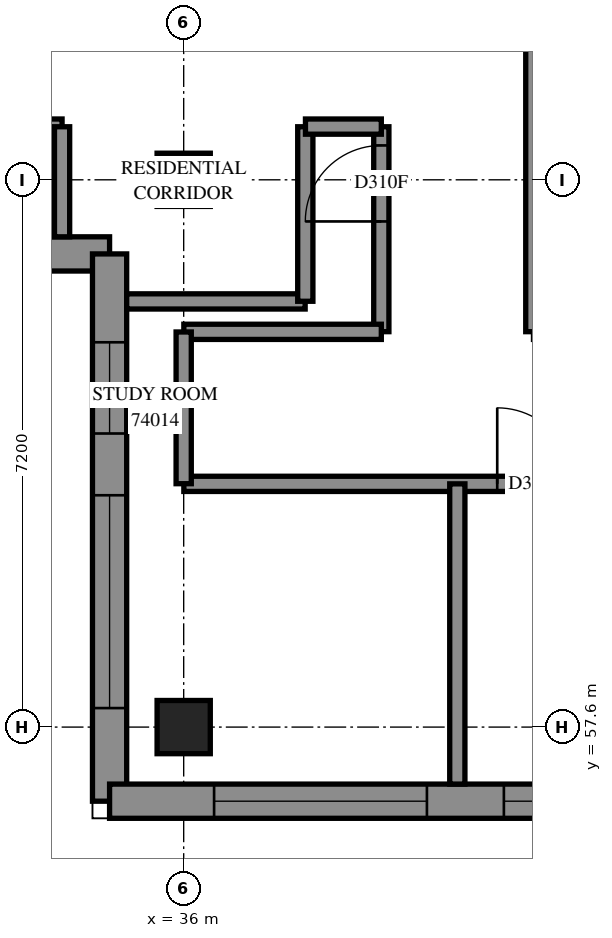
"""IFC4 building model, lengths in metres.
Left out: names, types, materials, properties, quantities, classifications, styles, units other than length and angle.
Written with IfcOpenShell. Run it as: python <this file> out.ifc"""

import sys

from ifc_helpers import new_model, si_unit, direction, frame, frame_2d, origin, origin_2d, place, context, subcontext, project, spatial, polyline, rectangle, outline, extrude, element, fill, save


model = new_model("IFC4")
c1 = context("Model", 3, precision=1e-05, world=origin(), true_north=direction((0.0, 1.0)))
c2 = subcontext(c1, "Body", "Model", "MODEL_VIEW")
j1 = project(units=[si_unit("LENGTHUNIT", "METRE"), si_unit("PLANEANGLEUNIT", "RADIAN")], contexts=[c1])
p1 = place(None, origin())
s1 = spatial("IfcSite", under=j1, at=p1, CompositionType="ELEMENT")
p2 = place(p1, origin())
s2 = spatial("IfcBuilding", under=s1, at=p2, CompositionType="ELEMENT")
p3 = place(p2, frame((0.0, 0.0, 271.0)))
s3 = spatial("IfcBuildingStorey", under=s2, at=p3, CompositionType="ELEMENT", Elevation=271.0)
for number, where, z_axis, x_axis in (
    (1, (36.0, 57.6, 0.0), (0.0, 0.0, 1.0), (1.0, 0.0, 0.0)),
    (2, (36.0, 64.8, 0.0), (0.0, 0.0, 1.0), (1.0, 0.0, 0.0)),
):
    element("IfcColumn", number, at=place(p3, frame(where, z_axis=z_axis, x_axis=x_axis)), inside=s3, PredefinedType="COLUMN", context=c2, shape_type="SweptSolid", body=[
        extrude(rectangle(XDim=0.7, YDim=0.7, at=origin_2d()), origin(), (0.0, 0.0, 1.0), 3.1),
    ])
p4 = place(p3, frame((26.683, 63.825, 0.0), z_axis=(0.0, 0.0, 1.0), x_axis=(1.0, 0.0, 0.0)))
e3 = element("IfcWall", 3, at=p4, inside=s3, PredefinedType="SOLIDWALL", context=c2, shape_type="SweptSolid", body=[
    extrude(outline(polyline([(-0.225, -0.225), (8.117, -0.225), (8.567, 0.225), (0.225, 0.225), (-0.225, -0.225)])), origin(), (0.0, 0.0, 1.0), 3.1),
])
p5 = place(p4, frame((2.517, 0.0, 0.45)))
e4 = element("IfcOpeningElement", 4, at=p5, cuts=e3, PredefinedType="OPENING", context=c2, shape_type="SweptSolid", body=[
    extrude(rectangle(XDim=2.8, YDim=2.55, at=frame_2d((1.4, 1.275))), frame((0.0, 0.235, 0.0), z_axis=(0.0, -1.0, 0.0), x_axis=(1.0, 0.0, 0.0)), (0.0, 0.0, 1.0), 0.47),
])
p6 = place(p4, frame((0.671, 0.0, 0.45)))
e5 = element("IfcOpeningElement", 5, at=p6, cuts=e3, PredefinedType="OPENING", context=c2, shape_type="SweptSolid", body=[
    extrude(rectangle(XDim=1.2, YDim=2.55, at=frame_2d((0.6, 1.275))), frame((0.0, 0.235, 0.0), z_axis=(0.0, -1.0, 0.0), x_axis=(1.0, 0.0, 0.0)), (0.0, 0.0, 1.0), 0.47),
])
p7 = place(p4, frame((6.33, 0.0, 0.45)))
e6 = element("IfcOpeningElement", 6, at=p7, cuts=e3, PredefinedType="OPENING", context=c2, shape_type="SweptSolid", body=[
    extrude(rectangle(XDim=1.2, YDim=2.55, at=frame_2d((0.6, 1.275))), frame((0.0, 0.235, 0.0), z_axis=(0.0, -1.0, 0.0), x_axis=(1.0, 0.0, 0.0)), (0.0, 0.0, 1.0), 0.47),
])
p8 = place(p3, frame((35.025, 63.825, 0.0), z_axis=(0.0, 0.0, 1.0), x_axis=(0.0, -1.0, 0.0)))
e7 = element("IfcWall", 7, at=p8, inside=s3, PredefinedType="SOLIDWALL", context=c2, shape_type="SweptSolid", body=[
    extrude(outline(polyline([(0.225, -0.225), (7.425, -0.225), (6.975, 0.225), (-0.225, 0.225), (0.225, -0.225)])), origin(), (0.0, 0.0, 1.0), 3.1),
])
p9 = place(p8, frame((3.175, 0.0, 0.45)))
e8 = element("IfcOpeningElement", 8, at=p9, cuts=e7, PredefinedType="OPENING", context=c2, shape_type="SweptSolid", body=[
    extrude(rectangle(XDim=2.8, YDim=2.55, at=frame_2d((1.4, 1.275))), frame((0.0, 0.235, 0.0), z_axis=(0.0, -1.0, 0.0), x_axis=(1.0, 0.0, 0.0)), (0.0, 0.0, 1.0), 0.47),
])
p10 = place(p8, frame((1.163, 0.0, 0.45)))
e9 = element("IfcOpeningElement", 9, at=p10, cuts=e7, PredefinedType="OPENING", context=c2, shape_type="SweptSolid", body=[
    extrude(rectangle(XDim=1.2, YDim=2.55, at=frame_2d((0.6, 1.275))), frame((0.0, 0.235, 0.0), z_axis=(0.0, -1.0, 0.0), x_axis=(1.0, 0.0, 0.0)), (0.0, 0.0, 1.0), 0.47),
])
p11 = place(p3, frame((35.025, 56.625, 0.0), z_axis=(0.0, 0.0, 1.0), x_axis=(1.0, 0.0, 0.0)))
e10 = element("IfcWall", 10, at=p11, inside=s3, PredefinedType="SOLIDWALL", context=c2, shape_type="SweptSolid", body=[
    extrude(outline(polyline([(-0.225, -0.225), (6.975, -0.225), (7.425, 0.225), (0.225, 0.225), (-0.225, -0.225)])), origin(), (0.0, 0.0, 1.0), 3.1),
])
p12 = place(p11, frame((1.375, 0.0, 0.45)))
e11 = element("IfcOpeningElement", 11, at=p12, cuts=e10, PredefinedType="OPENING", context=c2, shape_type="SweptSolid", body=[
    extrude(rectangle(XDim=2.8, YDim=2.55, at=frame_2d((1.4, 1.275))), frame((0.0, 0.235, 0.0), z_axis=(0.0, -1.0, 0.0), x_axis=(1.0, 0.0, 0.0)), (0.0, 0.0, 1.0), 0.47),
])
p13 = place(p11, frame((5.188, 0.0, 0.45)))
e12 = element("IfcOpeningElement", 12, at=p13, cuts=e10, PredefinedType="OPENING", context=c2, shape_type="SweptSolid", body=[
    extrude(rectangle(XDim=1.2, YDim=2.55, at=frame_2d((0.6, 1.275))), frame((0.0, 0.235, 0.0), z_axis=(0.0, -1.0, 0.0), x_axis=(1.0, 0.0, 0.0)), (0.0, 0.0, 1.0), 0.47),
])
p14 = place(p3, frame((36.002, 60.8, 0.0), z_axis=(0.0, 0.0, 1.0), x_axis=(1.0, 0.0, 0.0)))
e13 = element("IfcWall", 13, at=p14, inside=s3, PredefinedType="PARTITIONING", context=c2, shape_type="SweptSolid", body=[
    extrude(rectangle(XDim=16.998, YDim=0.2, at=frame_2d((8.499, 0.0))), origin(), (0.0, 0.0, 1.0), 3.1),
])
p15 = place(p14, frame((4.123, 0.0, 0.0)))
e14 = element("IfcOpeningElement", 14, at=p15, cuts=e13, PredefinedType="OPENING", context=c2, shape_type="SweptSolid", body=[
    extrude(rectangle(XDim=1.0, YDim=2.1, at=frame_2d((0.5, 1.05))), frame((0.0, 0.11, 0.0), z_axis=(0.0, -1.0, 0.0), x_axis=(1.0, 0.0, 0.0)), (0.0, 0.0, 1.0), 0.22),
])
p16 = place(p14, frame((9.23, 0.0, 0.0)))
e15 = element("IfcOpeningElement", 15, at=p16, cuts=e13, PredefinedType="OPENING", context=c2, shape_type="SweptSolid", body=[
    extrude(rectangle(XDim=1.0, YDim=2.1, at=frame_2d((0.5, 1.05))), frame((0.0, 0.11, 0.0), z_axis=(0.0, -1.0, 0.0), x_axis=(1.0, 0.0, 0.0)), (0.0, 0.0, 1.0), 0.22),
])
p17 = place(p14, frame((11.306, 0.0, 0.0)))
e16 = element("IfcOpeningElement", 16, at=p17, cuts=e13, PredefinedType="OPENING", context=c2, shape_type="SweptSolid", body=[
    extrude(rectangle(XDim=1.0, YDim=2.1, at=frame_2d((0.5, 1.05))), frame((0.0, 0.11, 0.0), z_axis=(0.0, -1.0, 0.0), x_axis=(1.0, 0.0, 0.0)), (0.0, 0.0, 1.0), 0.22),
])
p18 = place(p14, frame((15.872, 0.0, 0.0)))
e17 = element("IfcOpeningElement", 17, at=p18, cuts=e13, PredefinedType="OPENING", context=c2, shape_type="SweptSolid", body=[
    extrude(rectangle(XDim=1.0, YDim=2.1, at=frame_2d((0.5, 1.05))), frame((0.0, 0.11, 0.0), z_axis=(0.0, -1.0, 0.0), x_axis=(1.0, 0.0, 0.0)), (0.0, 0.0, 1.0), 0.22),
])
p19 = place(p3, frame((28.802, 65.5, 0.0), z_axis=(0.0, 0.0, 1.0), x_axis=(1.0, 0.0, 0.0)))
e18 = element("IfcWall", 18, at=p19, inside=s3, PredefinedType="PARTITIONING", context=c2, shape_type="SweptSolid", body=[
    extrude(rectangle(XDim=5.598, YDim=0.2, at=frame_2d((2.799, 0.0))), origin(), (0.0, 0.0, 1.0), 3.1),
])
p20 = place(p19, frame((2.702, 0.0, 0.0)))
e19 = element("IfcOpeningElement", 19, at=p20, cuts=e18, PredefinedType="OPENING", context=c2, shape_type="SweptSolid", body=[
    extrude(rectangle(XDim=1.0, YDim=2.1, at=frame_2d((0.5, 1.05))), frame((0.0, 0.11, 0.0), z_axis=(0.0, -1.0, 0.0), x_axis=(1.0, 0.0, 0.0)), (0.0, 0.0, 1.0), 0.22),
])
p21 = place(p3, frame((40.6, 62.802, 0.0), z_axis=(0.0, 0.0, 1.0), x_axis=(0.0, 1.0, 0.0)))
e20 = element("IfcWall", 20, at=p21, inside=s3, PredefinedType="PARTITIONING", context=c2, shape_type="SweptSolid", body=[
    extrude(rectangle(XDim=4.698, YDim=0.2, at=frame_2d((2.349, 0.0))), origin(), (0.0, 0.0, 1.0), 3.1),
])
p22 = place(p3, frame((39.6, 56.85, 0.0), z_axis=(0.0, 0.0, 1.0), x_axis=(0.0, 1.0, 0.0)))
e21 = element("IfcWall", 21, at=p22, inside=s3, PredefinedType="PARTITIONING", context=c2, shape_type="SweptSolid", body=[
    extrude(rectangle(XDim=3.95, YDim=0.2, at=frame_2d((1.975, 0.0))), origin(), (0.0, 0.0, 1.0), 3.1),
])
p23 = place(p3, frame((38.6, 62.802, 0.0), z_axis=(0.0, 0.0, 1.0), x_axis=(0.0, 1.0, 0.0)))
e22 = element("IfcWall", 22, at=p23, inside=s3, PredefinedType="PARTITIONING", context=c2, shape_type="SweptSolid", body=[
    extrude(rectangle(XDim=2.696, YDim=0.2, at=frame_2d((1.348, 0.0))), origin(), (0.0, 0.0, 1.0), 3.1),
])
p24 = place(p23, frame((1.45, 0.0, 0.0)))
e23 = element("IfcOpeningElement", 23, at=p24, cuts=e22, PredefinedType="OPENING", context=c2, shape_type="SweptSolid", body=[
    extrude(rectangle(XDim=1.0, YDim=2.1, at=frame_2d((0.5, 1.05))), frame((0.0, 0.11, 0.0), z_axis=(0.0, -1.0, 0.0), x_axis=(1.0, 0.0, 0.0)), (0.0, 0.0, 1.0), 0.22),
])
p25 = place(p3, frame((36.002, 62.8, 0.0), z_axis=(0.0, 0.0, 1.0), x_axis=(1.0, 0.0, 0.0)))
e24 = element("IfcWall", 24, at=p25, inside=s3, PredefinedType="PARTITIONING", context=c2, shape_type="SweptSolid", body=[
    extrude(rectangle(XDim=2.598, YDim=0.2, at=frame_2d((1.299, 0.0))), origin(), (0.0, 0.0, 1.0), 3.1),
])
p26 = place(p3, frame((35.25, 63.2, 0.0), z_axis=(0.0, 0.0, 1.0), x_axis=(1.0, 0.0, 0.0)))
e25 = element("IfcWall", 25, at=p26, inside=s3, PredefinedType="PARTITIONING", context=c2, shape_type="SweptSolid", body=[
    extrude(rectangle(XDim=2.348, YDim=0.2, at=frame_2d((1.174, 0.0))), origin(), (0.0, 0.0, 1.0), 3.1),
])
p27 = place(p3, frame((37.6, 63.202, 0.0), z_axis=(0.0, 0.0, 1.0), x_axis=(0.0, 1.0, 0.0)))
e26 = element("IfcWall", 26, at=p27, inside=s3, PredefinedType="PARTITIONING", context=c2, shape_type="SweptSolid", body=[
    extrude(rectangle(XDim=2.296, YDim=0.2, at=frame_2d((1.148, 0.0))), origin(), (0.0, 0.0, 1.0), 3.1),
])
p28 = place(p3, frame((36.0, 60.802, 0.0), z_axis=(0.0, 0.0, 1.0), x_axis=(0.0, 1.0, 0.0)))
e27 = element("IfcWall", 27, at=p28, inside=s3, PredefinedType="PARTITIONING", context=c2, shape_type="SweptSolid", body=[
    extrude(rectangle(XDim=1.996, YDim=0.2, at=frame_2d((0.998, 0.0))), origin(), (0.0, 0.0, 1.0), 2.6),
])
p29 = place(p3, frame((34.4, 64.05, 0.0), z_axis=(0.0, 0.0, 1.0), x_axis=(0.0, 1.0, 0.0)))
e28 = element("IfcWall", 28, at=p29, inside=s3, PredefinedType="PARTITIONING", context=c2, shape_type="SweptSolid", body=[
    extrude(rectangle(XDim=1.448, YDim=0.2, at=frame_2d((0.724, 0.0))), origin(), (0.0, 0.0, 1.0), 3.1),
])
p30 = place(p3, frame((37.602, 65.5, 0.0), z_axis=(0.0, 0.0, 1.0), x_axis=(1.0, 0.0, 0.0)))
e29 = element("IfcWall", 29, at=p30, inside=s3, PredefinedType="PARTITIONING", context=c2, shape_type="SweptSolid", body=[
    extrude(rectangle(XDim=0.998, YDim=0.2, at=frame_2d((0.499, 0.0))), origin(), (0.0, 0.0, 1.0), 3.1),
])
p31 = place(p9, origin())
e30 = element("IfcWindow", 30, at=p31, inside=s3, PartitioningType="SINGLE_PANEL", PredefinedType="WINDOW", context=c2, shape_type="SweptSolid", body=[
    extrude(rectangle(XDim=2.8, YDim=2.55, at=frame_2d((1.4, 1.275))), frame((0.0, 0.205, 0.0), z_axis=(0.0, -1.0, 0.0), x_axis=(1.0, 0.0, 0.0)), (0.0, 0.0, 1.0), 0.06),
])
fill(e8, e30)
p32 = place(p10, origin())
e31 = element("IfcWindow", 31, at=p32, inside=s3, PartitioningType="SINGLE_PANEL", PredefinedType="WINDOW", context=c2, shape_type="SweptSolid", body=[
    extrude(rectangle(XDim=1.2, YDim=2.55, at=frame_2d((0.6, 1.275))), frame((0.0, 0.205, 0.0), z_axis=(0.0, -1.0, 0.0), x_axis=(1.0, 0.0, 0.0)), (0.0, 0.0, 1.0), 0.06),
])
fill(e9, e31)
p33 = place(p12, origin())
e32 = element("IfcWindow", 32, at=p33, inside=s3, PartitioningType="SINGLE_PANEL", PredefinedType="WINDOW", context=c2, shape_type="SweptSolid", body=[
    extrude(rectangle(XDim=2.8, YDim=2.55, at=frame_2d((1.4, 1.275))), frame((0.0, 0.205, 0.0), z_axis=(0.0, -1.0, 0.0), x_axis=(1.0, 0.0, 0.0)), (0.0, 0.0, 1.0), 0.06),
])
fill(e11, e32)
p34 = place(p13, origin())
e33 = element("IfcWindow", 33, at=p34, inside=s3, PartitioningType="SINGLE_PANEL", PredefinedType="WINDOW", context=c2, shape_type="SweptSolid", body=[
    extrude(rectangle(XDim=1.2, YDim=2.55, at=frame_2d((0.6, 1.275))), frame((0.0, 0.205, 0.0), z_axis=(0.0, -1.0, 0.0), x_axis=(1.0, 0.0, 0.0)), (0.0, 0.0, 1.0), 0.06),
])
fill(e12, e33)
p35 = place(p24, origin())
e34 = element("IfcDoor", 34, at=p35, inside=s3, OperationType="SINGLE_SWING_LEFT", PredefinedType="DOOR", context=c2, shape_type="SweptSolid", body=[
    extrude(rectangle(XDim=1.0, YDim=2.1, at=frame_2d((0.5, 1.05))), frame((0.0, 0.025, 0.0), z_axis=(0.0, -1.0, 0.0), x_axis=(1.0, 0.0, 0.0)), (0.0, 0.0, 1.0), 0.05),
])
fill(e23, e34)
p36 = place(p15, origin())
e35 = element("IfcDoor", 35, at=p36, inside=s3, OperationType="SINGLE_SWING_RIGHT", PredefinedType="DOOR", context=c2, shape_type="SweptSolid", body=[
    extrude(rectangle(XDim=1.0, YDim=2.1, at=frame_2d((0.5, 1.05))), frame((0.0, 0.025, 0.0), z_axis=(0.0, -1.0, 0.0), x_axis=(1.0, 0.0, 0.0)), (0.0, 0.0, 1.0), 0.05),
])
fill(e14, e35)
save(model, sys.argv[1])
